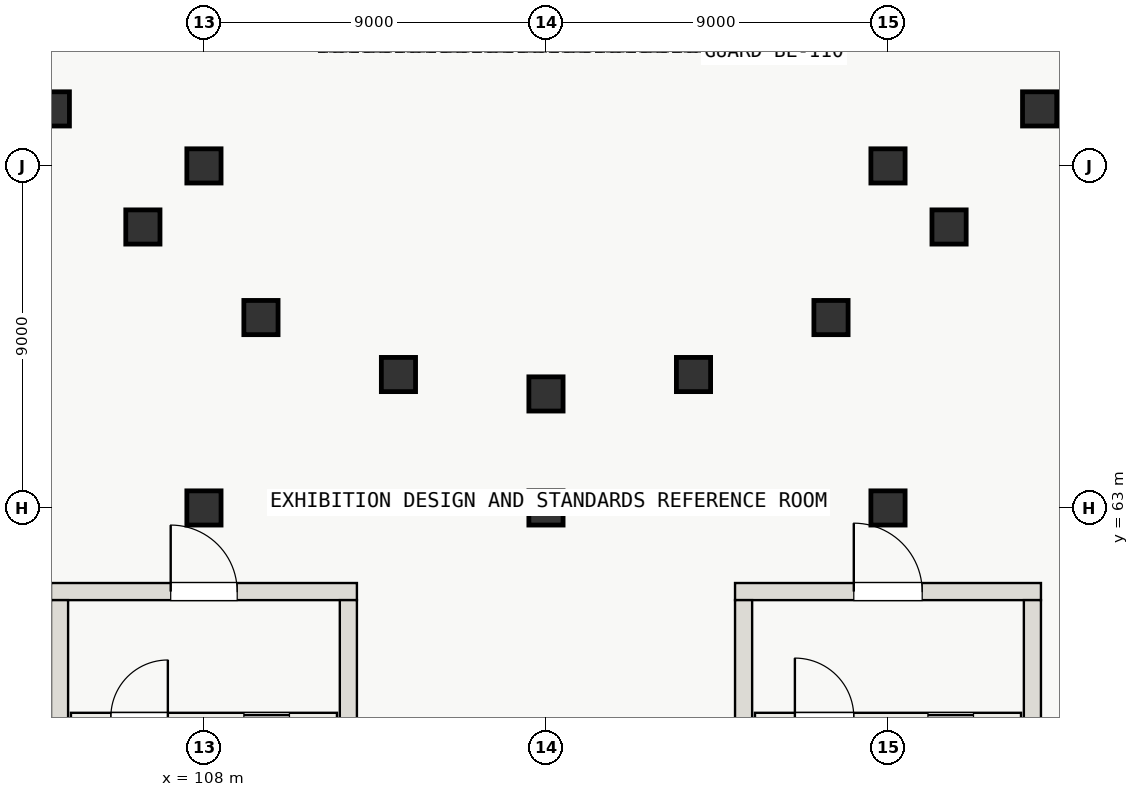
"""IFC4 building model, lengths in metres.
Left out: names, types, materials, properties, quantities, classifications, styles, units other than length and angle.
Written with IfcOpenShell. Run it as: python <this file> out.ifc"""

import sys

from ifc_helpers import new_model, si_unit, direction, frame, frame_2d, origin, origin_2d, place, context, subcontext, project, spatial, rectangle, circle, extrude, element, fill, save


model = new_model("IFC4")
c1 = context("Model", 3, precision=1e-05, world=origin(), true_north=direction((0.0, 1.0)))
c2 = subcontext(c1, "Body", "Model", "MODEL_VIEW")
j1 = project(units=[si_unit("LENGTHUNIT", "METRE"), si_unit("PLANEANGLEUNIT", "RADIAN")], contexts=[c1])
p1 = place(None, origin())
s1 = spatial("IfcSite", under=j1, at=p1, CompositionType="ELEMENT")
p2 = place(p1, origin())
s2 = spatial("IfcBuilding", under=s1, at=p2, CompositionType="ELEMENT")
p3 = place(p2, frame((0.0, 0.0, 16.8)))
s3 = spatial("IfcBuildingStorey", under=s2, at=p3, CompositionType="ELEMENT", Elevation=16.8)
p4 = place(p3, frame((103.975, 60.8, 0.0), z_axis=(0.0, 0.0, 1.0), x_axis=(1.0, 0.0, 0.0)))
e1 = element("IfcWall", 1, at=p4, inside=s3, PredefinedType="SHEAR", context=c2, shape_type="SweptSolid", body=[
    extrude(rectangle(XDim=8.05, YDim=0.45, at=frame_2d((4.025, 0.0))), origin(), (0.0, 0.0, 1.0), 4.8),
])
p5 = place(p4, frame((3.15, 0.0, 0.0)))
e2 = element("IfcOpeningElement", 2, at=p5, cuts=e1, PredefinedType="OPENING", context=c2, shape_type="SweptSolid", body=[
    extrude(rectangle(XDim=1.75, YDim=2.3, at=frame_2d((0.875, 1.15))), frame((0.0, 0.235, 0.0), z_axis=(0.0, -1.0, 0.0), x_axis=(1.0, 0.0, 0.0)), (0.0, 0.0, 1.0), 0.47),
])
for number, where, z_axis, x_axis in (
    (3, (104.2, 49.425, 0.0), (0.0, 0.0, 1.0), (0.0, 1.0, 0.0)),
    (4, (111.8, 49.425, 0.0), (0.0, 0.0, 1.0), (0.0, 1.0, 0.0)),
):
    element("IfcWall", number, at=place(p3, frame(where, z_axis=z_axis, x_axis=x_axis)), inside=s3, PredefinedType="SHEAR", context=c2, shape_type="SweptSolid", body=[
        extrude(rectangle(XDim=11.15, YDim=0.45, at=frame_2d((5.575, 0.0))), origin(), (0.0, 0.0, 1.0), 4.8),
    ])
p6 = place(p3, frame((121.975, 60.8, 0.0), z_axis=(0.0, 0.0, 1.0), x_axis=(1.0, 0.0, 0.0)))
e5 = element("IfcWall", 5, at=p6, inside=s3, PredefinedType="SHEAR", context=c2, shape_type="SweptSolid", body=[
    extrude(rectangle(XDim=8.05, YDim=0.45, at=frame_2d((4.025, 0.0))), origin(), (0.0, 0.0, 1.0), 4.8),
])
p7 = place(p6, frame((3.125, 0.0, 0.0)))
e6 = element("IfcOpeningElement", 6, at=p7, cuts=e5, PredefinedType="OPENING", context=c2, shape_type="SweptSolid", body=[
    extrude(rectangle(XDim=1.8, YDim=2.3, at=frame_2d((0.9, 1.15))), frame((0.0, 0.235, 0.0), z_axis=(0.0, -1.0, 0.0), x_axis=(1.0, 0.0, 0.0)), (0.0, 0.0, 1.0), 0.47),
])
for number, where, z_axis, x_axis in (
    (7, (122.2, 49.425, 0.0), (0.0, 0.0, 1.0), (0.0, 1.0, 0.0)),
    (8, (129.8, 49.425, 0.0), (0.0, 0.0, 1.0), (0.0, 1.0, 0.0)),
):
    element("IfcWall", number, at=place(p3, frame(where, z_axis=z_axis, x_axis=x_axis)), inside=s3, PredefinedType="SHEAR", context=c2, shape_type="SweptSolid", body=[
        extrude(rectangle(XDim=11.15, YDim=0.45, at=frame_2d((5.575, 0.0))), origin(), (0.0, 0.0, 1.0), 4.8),
    ])
for number, where, z_axis, x_axis in (
    (9, (104.01, 73.5, 0.0), (0.0, 0.0, 1.0), (1.0, 0.0, 0.0)),
    (10, (106.393, 70.393, 0.0), (0.0, 0.0, 1.0), (1.0, 0.0, 0.0)),
):
    element("IfcColumn", number, at=place(p3, frame(where, z_axis=z_axis, x_axis=x_axis)), inside=s3, PredefinedType="COLUMN", context=c2, shape_type="SweptSolid", body=[
        extrude(circle(Radius=0.45, at=origin_2d()), origin(), (0.0, 0.0, 1.0), 4.45),
    ])
for number, where, z_axis, x_axis in (
    (11, (108.0, 63.0, 0.0), (0.0, 0.0, 1.0), (1.0, 0.0, 0.0)),
    (12, (108.0, 72.0, 0.0), (0.0, 0.0, 1.0), (1.0, 0.0, 0.0)),
):
    element("IfcColumn", number, at=place(p3, frame(where, z_axis=z_axis, x_axis=x_axis)), inside=s3, PredefinedType="COLUMN", context=c2, shape_type="SweptSolid", body=[
        extrude(rectangle(XDim=0.9, YDim=0.9, at=origin_2d()), origin(), (0.0, 0.0, 1.0), 4.8),
    ])
for number, where, z_axis, x_axis in (
    (13, (109.5, 68.01, 0.0), (0.0, 0.0, 1.0), (1.0, 0.0, 0.0)),
    (14, (113.118, 66.511, 0.0), (0.0, 0.0, 1.0), (1.0, 0.0, 0.0)),
):
    element("IfcColumn", number, at=place(p3, frame(where, z_axis=z_axis, x_axis=x_axis)), inside=s3, PredefinedType="COLUMN", context=c2, shape_type="SweptSolid", body=[
        extrude(circle(Radius=0.45, at=origin_2d()), origin(), (0.0, 0.0, 1.0), 4.45),
    ])
p8 = place(p3, frame((117.0, 63.0, 0.0), z_axis=(0.0, 0.0, 1.0), x_axis=(1.0, 0.0, 0.0)))
e15 = element("IfcColumn", 15, at=p8, inside=s3, PredefinedType="COLUMN", context=c2, shape_type="SweptSolid", body=[
    extrude(rectangle(XDim=0.9, YDim=0.9, at=origin_2d()), origin(), (0.0, 0.0, 1.0), 4.8),
])
for number, where, z_axis, x_axis in (
    (16, (117.0, 66.0, 0.0), (0.0, 0.0, 1.0), (1.0, 0.0, 0.0)),
    (17, (120.882, 66.511, 0.0), (0.0, 0.0, 1.0), (1.0, 0.0, 0.0)),
    (18, (124.5, 68.01, 0.0), (0.0, 0.0, 1.0), (1.0, 0.0, 0.0)),
):
    element("IfcColumn", number, at=place(p3, frame(where, z_axis=z_axis, x_axis=x_axis)), inside=s3, PredefinedType="COLUMN", context=c2, shape_type="SweptSolid", body=[
        extrude(circle(Radius=0.45, at=origin_2d()), origin(), (0.0, 0.0, 1.0), 4.45),
    ])
for number, where, z_axis, x_axis in (
    (19, (126.0, 63.0, 0.0), (0.0, 0.0, 1.0), (1.0, 0.0, 0.0)),
    (20, (126.0, 72.0, 0.0), (0.0, 0.0, 1.0), (1.0, 0.0, 0.0)),
):
    element("IfcColumn", number, at=place(p3, frame(where, z_axis=z_axis, x_axis=x_axis)), inside=s3, PredefinedType="COLUMN", context=c2, shape_type="SweptSolid", body=[
        extrude(rectangle(XDim=0.9, YDim=0.9, at=origin_2d()), origin(), (0.0, 0.0, 1.0), 4.8),
    ])
for number, where, z_axis, x_axis in (
    (21, (127.607, 70.393, 0.0), (0.0, 0.0, 1.0), (1.0, 0.0, 0.0)),
    (22, (129.99, 73.5, 0.0), (0.0, 0.0, 1.0), (1.0, 0.0, 0.0)),
):
    element("IfcColumn", number, at=place(p3, frame(where, z_axis=z_axis, x_axis=x_axis)), inside=s3, PredefinedType="COLUMN", context=c2, shape_type="SweptSolid", body=[
        extrude(circle(Radius=0.45, at=origin_2d()), origin(), (0.0, 0.0, 1.0), 4.45),
    ])
p9 = place(p3, frame((104.5, 57.5, 0.0), z_axis=(0.0, 0.0, 1.0), x_axis=(1.0, 0.0, 0.0)))
e23 = element("IfcWall", 23, at=p9, inside=s3, PredefinedType="SOLIDWALL", context=c2, shape_type="SweptSolid", body=[
    extrude(rectangle(XDim=7.0, YDim=0.22, at=frame_2d((3.5, 0.0))), origin(), (0.0, 0.0, 1.0), 4.49),
])
p10 = place(p9, frame((1.05, 0.0, 0.0)))
e24 = element("IfcOpeningElement", 24, at=p10, cuts=e23, PredefinedType="OPENING", context=c2, shape_type="SweptSolid", body=[
    extrude(rectangle(XDim=1.5, YDim=2.2, at=frame_2d((0.75, 1.1))), frame((0.0, 0.12, 0.0), z_axis=(0.0, -1.0, 0.0), x_axis=(1.0, 0.0, 0.0)), (0.0, 0.0, 1.0), 0.24),
])
p11 = place(p9, frame((4.55, 0.0, 0.0)))
e25 = element("IfcOpeningElement", 25, at=p11, cuts=e23, PredefinedType="OPENING", context=c2, shape_type="SweptSolid", body=[
    extrude(rectangle(XDim=1.2, YDim=2.2, at=frame_2d((0.6, 1.1))), frame((0.0, 0.12, 0.0), z_axis=(0.0, -1.0, 0.0), x_axis=(1.0, 0.0, 0.0)), (0.0, 0.0, 1.0), 0.24),
])
p12 = place(p3, frame((122.5, 57.5, 0.0), z_axis=(0.0, 0.0, 1.0), x_axis=(1.0, 0.0, 0.0)))
e26 = element("IfcWall", 26, at=p12, inside=s3, PredefinedType="SOLIDWALL", context=c2, shape_type="SweptSolid", body=[
    extrude(rectangle(XDim=7.0, YDim=0.22, at=frame_2d((3.5, 0.0))), origin(), (0.0, 0.0, 1.0), 4.49),
])
p13 = place(p12, frame((1.05, 0.0, 0.0)))
e27 = element("IfcOpeningElement", 27, at=p13, cuts=e26, PredefinedType="OPENING", context=c2, shape_type="SweptSolid", body=[
    extrude(rectangle(XDim=1.55, YDim=2.2, at=frame_2d((0.775, 1.1))), frame((0.0, 0.12, 0.0), z_axis=(0.0, -1.0, 0.0), x_axis=(1.0, 0.0, 0.0)), (0.0, 0.0, 1.0), 0.24),
])
p14 = place(p12, frame((4.55, 0.0, 0.0)))
e28 = element("IfcOpeningElement", 28, at=p14, cuts=e26, PredefinedType="OPENING", context=c2, shape_type="SweptSolid", body=[
    extrude(rectangle(XDim=1.2, YDim=2.2, at=frame_2d((0.6, 1.1))), frame((0.0, 0.12, 0.0), z_axis=(0.0, -1.0, 0.0), x_axis=(1.0, 0.0, 0.0)), (0.0, 0.0, 1.0), 0.24),
])
p15 = place(p10, origin())
e29 = element("IfcDoor", 29, at=p15, inside=s3, OperationType="SINGLE_SWING_RIGHT", PredefinedType="DOOR", context=c2, shape_type="SweptSolid", body=[
    extrude(rectangle(XDim=1.5, YDim=2.2, at=frame_2d((0.75, 1.1))), frame((0.0, 0.025, 0.0), z_axis=(0.0, -1.0, 0.0), x_axis=(1.0, 0.0, 0.0)), (0.0, 0.0, 1.0), 0.05),
])
fill(e24, e29)
p16 = place(p11, origin())
e30 = element("IfcDoor", 30, at=p16, inside=s3, OperationType="SLIDING_TO_RIGHT", PredefinedType="DOOR", context=c2, shape_type="SweptSolid", body=[
    extrude(rectangle(XDim=1.2, YDim=2.2, at=frame_2d((0.6, 1.1))), frame((0.0, 0.025, 0.0), z_axis=(0.0, -1.0, 0.0), x_axis=(1.0, 0.0, 0.0)), (0.0, 0.0, 1.0), 0.05),
])
fill(e25, e30)
p17 = place(p5, origin())
e31 = element("IfcDoor", 31, at=p17, inside=s3, OperationType="DOUBLE_DOOR_SINGLE_SWING", PredefinedType="DOOR", context=c2, shape_type="SweptSolid", body=[
    extrude(rectangle(XDim=1.75, YDim=2.3, at=frame_2d((0.875, 1.15))), frame((0.0, 0.025, 0.0), z_axis=(0.0, -1.0, 0.0), x_axis=(1.0, 0.0, 0.0)), (0.0, 0.0, 1.0), 0.05),
])
fill(e2, e31)
p18 = place(p13, origin())
e32 = element("IfcDoor", 32, at=p18, inside=s3, OperationType="SINGLE_SWING_LEFT", PredefinedType="DOOR", context=c2, shape_type="SweptSolid", body=[
    extrude(rectangle(XDim=1.55, YDim=2.2, at=frame_2d((0.775, 1.1))), frame((0.0, 0.025, 0.0), z_axis=(0.0, -1.0, 0.0), x_axis=(1.0, 0.0, 0.0)), (0.0, 0.0, 1.0), 0.05),
])
fill(e27, e32)
p19 = place(p14, origin())
e33 = element("IfcDoor", 33, at=p19, inside=s3, OperationType="SLIDING_TO_LEFT", PredefinedType="DOOR", context=c2, shape_type="SweptSolid", body=[
    extrude(rectangle(XDim=1.2, YDim=2.2, at=frame_2d((0.6, 1.1))), frame((0.0, 0.025, 0.0), z_axis=(0.0, -1.0, 0.0), x_axis=(1.0, 0.0, 0.0)), (0.0, 0.0, 1.0), 0.05),
])
fill(e28, e33)
p20 = place(p7, origin())
e34 = element("IfcDoor", 34, at=p20, inside=s3, OperationType="DOUBLE_DOOR_SINGLE_SWING", PredefinedType="DOOR", context=c2, shape_type="SweptSolid", body=[
    extrude(rectangle(XDim=1.8, YDim=2.3, at=frame_2d((0.9, 1.15))), frame((0.0, 0.025, 0.0), z_axis=(0.0, -1.0, 0.0), x_axis=(1.0, 0.0, 0.0)), (0.0, 0.0, 1.0), 0.05),
])
fill(e6, e34)
save(model, sys.argv[1])
